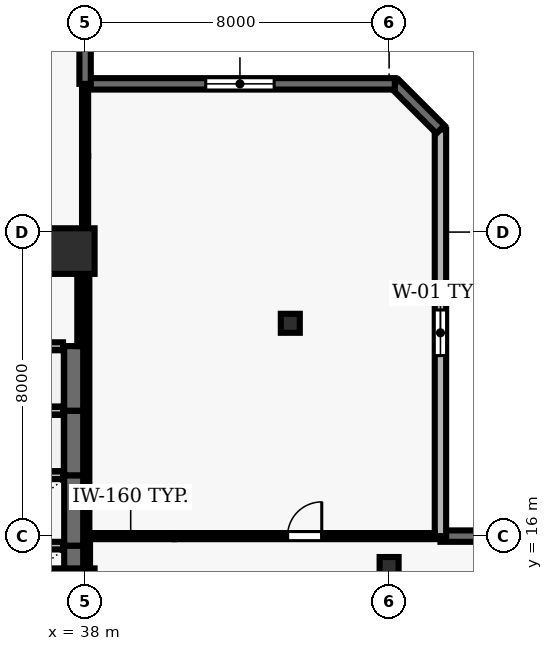
"""IFC4 building model, lengths in metres.
Left out: names, types, materials, properties, quantities, classifications, styles, units other than length and angle.
Written with IfcOpenShell. Run it as: python <this file> out.ifc"""

import sys

from ifc_helpers import new_model, si_unit, direction, frame, frame_2d, origin, origin_2d, place, context, subcontext, project, spatial, rectangle, hollow_rectangle, extrude, element, fill, save


model = new_model("IFC4")
c1 = context("Model", 3, precision=1e-05, world=origin(), true_north=direction((0.0, 1.0)))
c2 = subcontext(c1, "Body", "Model", "MODEL_VIEW")
j1 = project(units=[si_unit("LENGTHUNIT", "METRE"), si_unit("PLANEANGLEUNIT", "RADIAN")], contexts=[c1])
p1 = place(None, origin())
s1 = spatial("IfcSite", under=j1, at=p1, CompositionType="ELEMENT")
p2 = place(p1, origin())
s2 = spatial("IfcBuilding", under=s1, at=p2, CompositionType="ELEMENT")
p3 = place(p2, frame((0.0, 0.0, 130.7)))
s3 = spatial("IfcBuildingStorey", under=s2, at=p3, CompositionType="ELEMENT", Elevation=130.7)
for number, where, z_axis, x_axis in (
    (1, (37.65, 14.55, 0.0), (0.0, 0.0, 1.0), (1.0, 0.0, 0.0)),
    (2, (37.65, 23.5, 0.0), (0.0, 0.0, 1.0), (1.0, 0.0, 0.0)),
):
    element("IfcColumn", number, at=place(p3, frame(where, z_axis=z_axis, x_axis=x_axis)), inside=s3, PredefinedType="COLUMN", context=c2, shape_type="SweptSolid", body=[
        extrude(rectangle(XDim=1.2, YDim=1.2, at=origin_2d()), origin(), (0.0, 0.0, 1.0), 3.9),
    ])
for number, where, z_axis, x_axis in (
    (3, (46.0, 15.2, 0.0), (0.0, 0.0, 1.0), (1.0, 0.0, 0.0)),
    (4, (43.4, 21.6, 0.0), (0.0, 0.0, 1.0), (1.0, 0.0, 0.0)),
):
    element("IfcColumn", number, at=place(p3, frame(where, z_axis=z_axis, x_axis=x_axis)), inside=s3, PredefinedType="COLUMN", context=c2, shape_type="SweptSolid", body=[
        extrude(hollow_rectangle(XDim=0.5, YDim=0.5, WallThickness=0.025, at=origin_2d()), origin(), (0.0, 0.0, 1.0), 3.9),
    ])
p4 = place(p3, frame((68.1, 16.0, 0.0), z_axis=(0.0, 0.0, 1.0), x_axis=(-1.0, 0.0, 0.0)))
e5 = element("IfcWall", 5, at=p4, inside=s3, PredefinedType="SOLIDWALL", context=c2, shape_type="SweptSolid", body=[
    extrude(rectangle(XDim=20.749, YDim=0.3, at=frame_2d((10.375, 0.0))), origin(), (0.0, 0.0, 1.0), 3.69),
])
p5 = place(p4, frame((11.974, 0.0, 0.0)))
e6 = element("IfcOpeningElement", 6, at=p5, cuts=e5, PredefinedType="OPENING", context=c2, shape_type="SweptSolid", body=[
    extrude(rectangle(XDim=1.0, YDim=2.2, at=frame_2d((0.5, 1.1))), frame((0.0, 0.16, 0.0), z_axis=(0.0, -1.0, 0.0), x_axis=(1.0, 0.0, 0.0)), (0.0, 0.0, 1.0), 0.32),
])
p6 = place(p4, frame((1.958, 0.0, 0.9)))
e7 = element("IfcOpeningElement", 7, at=p6, cuts=e5, PredefinedType="OPENING", context=c2, shape_type="SweptSolid", body=[
    extrude(rectangle(XDim=3.0, YDim=2.2, at=frame_2d((1.5, 1.1))), frame((0.0, 0.16, 0.0), z_axis=(0.0, -1.0, 0.0), x_axis=(1.0, 0.0, 0.0)), (0.0, 0.0, 1.0), 0.32),
])
p7 = place(p4, frame((8.424, 0.0, 0.9)))
e8 = element("IfcOpeningElement", 8, at=p7, cuts=e5, PredefinedType="OPENING", context=c2, shape_type="SweptSolid", body=[
    extrude(rectangle(XDim=3.0, YDim=2.2, at=frame_2d((1.5, 1.1))), frame((0.0, 0.16, 0.0), z_axis=(0.0, -1.0, 0.0), x_axis=(1.0, 0.0, 0.0)), (0.0, 0.0, 1.0), 0.32),
])
p8 = place(p4, frame((15.791, 0.0, 0.9)))
e9 = element("IfcOpeningElement", 9, at=p8, cuts=e5, PredefinedType="OPENING", context=c2, shape_type="SweptSolid", body=[
    extrude(rectangle(XDim=3.0, YDim=2.2, at=frame_2d((1.5, 1.1))), frame((0.0, 0.16, 0.0), z_axis=(0.0, -1.0, 0.0), x_axis=(1.0, 0.0, 0.0)), (0.0, 0.0, 1.0), 0.32),
])
p9 = place(p3, frame((47.351, 16.0, 0.0), z_axis=(0.0, 0.0, 1.0), x_axis=(0.0, 1.0, 0.0)))
e10 = element("IfcWall", 10, at=p9, inside=s3, PredefinedType="SOLIDWALL", context=c2, shape_type="SweptSolid", body=[
    extrude(rectangle(XDim=10.7, YDim=0.3, at=frame_2d((5.35, 0.0))), origin(), (0.0, 0.0, 1.0), 3.69),
])
p10 = place(p9, frame((4.75, 0.0, 0.9)))
e11 = element("IfcOpeningElement", 11, at=p10, cuts=e10, PredefinedType="OPENING", context=c2, shape_type="SweptSolid", body=[
    extrude(rectangle(XDim=1.2, YDim=1.6, at=frame_2d((0.6, 0.8))), frame((0.0, 0.16, 0.0), z_axis=(0.0, -1.0, 0.0), x_axis=(1.0, 0.0, 0.0)), (0.0, 0.0, 1.0), 0.32),
])
p11 = place(p3, frame((47.351, 26.7, 0.0), z_axis=(0.0, 0.0, 1.0), x_axis=(-0.707178703759, 0.707034851297, 0.0)))
e12 = element("IfcWall", 12, at=p11, inside=s3, PredefinedType="SOLIDWALL", context=c2, shape_type="SweptSolid", body=[
    extrude(rectangle(XDim=1.697, YDim=0.3, at=frame_2d((0.849, 0.0))), origin(), (0.0, 0.0, 1.0), 3.69),
])
p12 = place(p3, frame((46.151, 27.9, 0.0), z_axis=(0.0, 0.0, 1.0), x_axis=(-1.0, 0.0, 0.0)))
e13 = element("IfcWall", 13, at=p12, inside=s3, PredefinedType="SOLIDWALL", context=c2, shape_type="SweptSolid", body=[
    extrude(rectangle(XDim=8.151, YDim=0.3, at=frame_2d((4.075, 0.0))), origin(), (0.0, 0.0, 1.0), 3.69),
])
p13 = place(p12, frame((3.176, 0.0, 0.9)))
e14 = element("IfcOpeningElement", 14, at=p13, cuts=e13, PredefinedType="OPENING", context=c2, shape_type="SweptSolid", body=[
    extrude(rectangle(XDim=1.8, YDim=1.6, at=frame_2d((0.9, 0.8))), frame((0.0, 0.16, 0.0), z_axis=(0.0, -1.0, 0.0), x_axis=(1.0, 0.0, 0.0)), (0.0, 0.0, 1.0), 0.32),
])
p14 = place(p3, frame((38.0, 27.9, 0.0), z_axis=(0.0, 0.0, 1.0), x_axis=(0.0, 1.0, 0.0)))
e15 = element("IfcWall", 15, at=p14, inside=s3, PredefinedType="SOLIDWALL", context=c2, shape_type="SweptSolid", body=[
    extrude(rectangle(XDim=18.2, YDim=0.3, at=frame_2d((9.1, 0.0))), origin(), (0.0, 0.0, 1.0), 3.69),
])
p15 = place(p14, frame((9.8, 0.0, 0.0)))
e16 = element("IfcOpeningElement", 16, at=p15, cuts=e15, PredefinedType="OPENING", context=c2, shape_type="SweptSolid", body=[
    extrude(rectangle(XDim=1.0, YDim=2.2, at=frame_2d((0.5, 1.1))), frame((0.0, 0.16, 0.0), z_axis=(0.0, -1.0, 0.0), x_axis=(1.0, 0.0, 0.0)), (0.0, 0.0, 1.0), 0.32),
])
p16 = place(p14, frame((2.883, 0.0, 0.9)))
e17 = element("IfcOpeningElement", 17, at=p16, cuts=e15, PredefinedType="OPENING", context=c2, shape_type="SweptSolid", body=[
    extrude(rectangle(XDim=2.1, YDim=1.6, at=frame_2d((1.05, 0.8))), frame((0.0, 0.16, 0.0), z_axis=(0.0, -1.0, 0.0), x_axis=(1.0, 0.0, 0.0)), (0.0, 0.0, 1.0), 0.32),
])
p17 = place(p14, frame((14.117, 0.0, 0.9)))
e18 = element("IfcOpeningElement", 18, at=p17, cuts=e15, PredefinedType="OPENING", context=c2, shape_type="SweptSolid", body=[
    extrude(rectangle(XDim=2.1, YDim=1.6, at=frame_2d((1.05, 0.8))), frame((0.0, 0.16, 0.0), z_axis=(0.0, -1.0, 0.0), x_axis=(1.0, 0.0, 0.0)), (0.0, 0.0, 1.0), 0.32),
])
p18 = place(p3, frame((37.7, 13.9, 0.0), z_axis=(0.0, 0.0, 1.0), x_axis=(0.0, 1.0, 0.0)))
e19 = element("IfcWall", 19, at=p18, inside=s3, PredefinedType="SHEAR", context=c2, shape_type="SweptSolid", body=[
    extrude(rectangle(XDim=1.85, YDim=0.5, at=frame_2d((0.925, 0.0))), origin(), (0.0, 0.0, 1.0), 3.69),
])
p19 = place(p3, frame((37.42, 15.75, 0.0), z_axis=(0.0, 0.0, 1.0), x_axis=(-1.0, 0.0, 0.0)))
e20 = element("IfcWall", 20, at=p19, inside=s3, PredefinedType="SOLIDWALL", context=c2, shape_type="SweptSolid", body=[
    extrude(rectangle(XDim=2.14, YDim=0.2, at=frame_2d((1.07, 0.0))), origin(), (0.0, 0.0, 1.0), 3.69),
])
p20 = place(p3, frame((37.7, 15.75, 0.0), z_axis=(0.0, 0.0, 1.0), x_axis=(0.0, 1.0, 0.0)))
e21 = element("IfcWall", 21, at=p20, inside=s3, PredefinedType="SHEAR", context=c2, shape_type="SweptSolid", body=[
    extrude(rectangle(XDim=1.85, YDim=0.5, at=frame_2d((0.925, 0.0))), origin(), (0.0, 0.0, 1.0), 3.69),
])
p21 = place(p3, frame((37.42, 17.6, 0.0), z_axis=(0.0, 0.0, 1.0), x_axis=(-1.0, 0.0, 0.0)))
e22 = element("IfcWall", 22, at=p21, inside=s3, PredefinedType="SOLIDWALL", context=c2, shape_type="SweptSolid", body=[
    extrude(rectangle(XDim=2.14, YDim=0.2, at=frame_2d((1.07, 0.0))), origin(), (0.0, 0.0, 1.0), 3.69),
])
p22 = place(p3, frame((37.7, 17.6, 0.0), z_axis=(0.0, 0.0, 1.0), x_axis=(0.0, 1.0, 0.0)))
e23 = element("IfcWall", 23, at=p22, inside=s3, PredefinedType="SHEAR", context=c2, shape_type="SweptSolid", body=[
    extrude(rectangle(XDim=1.7, YDim=0.5, at=frame_2d((0.85, 0.0))), origin(), (0.0, 0.0, 1.0), 3.69),
])
p23 = place(p3, frame((37.42, 19.3, 0.0), z_axis=(0.0, 0.0, 1.0), x_axis=(-1.0, 0.0, 0.0)))
e24 = element("IfcWall", 24, at=p23, inside=s3, PredefinedType="SOLIDWALL", context=c2, shape_type="SweptSolid", body=[
    extrude(rectangle(XDim=2.14, YDim=0.2, at=frame_2d((1.07, 0.0))), origin(), (0.0, 0.0, 1.0), 3.69),
])
p24 = place(p3, frame((37.7, 19.3, 0.0), z_axis=(0.0, 0.0, 1.0), x_axis=(0.0, 1.0, 0.0)))
e25 = element("IfcWall", 25, at=p24, inside=s3, PredefinedType="SHEAR", context=c2, shape_type="SweptSolid", body=[
    extrude(rectangle(XDim=1.7, YDim=0.5, at=frame_2d((0.85, 0.0))), origin(), (0.0, 0.0, 1.0), 3.69),
])
p25 = place(p3, frame((37.42, 21.0, 0.0), z_axis=(0.0, 0.0, 1.0), x_axis=(-1.0, 0.0, 0.0)))
e26 = element("IfcWall", 26, at=p25, inside=s3, PredefinedType="SOLIDWALL", context=c2, shape_type="SweptSolid", body=[
    extrude(rectangle(XDim=2.14, YDim=0.2, at=frame_2d((1.07, 0.0))), origin(), (0.0, 0.0, 1.0), 3.69),
])
p26 = place(p3, frame((37.85, 23.85, 0.0), z_axis=(0.0, 0.0, 1.0), x_axis=(-1.0, 0.0, 0.0)))
e27 = element("IfcWall", 27, at=p26, inside=s3, PredefinedType="PARTITIONING", context=c2, shape_type="SweptSolid", body=[
    extrude(rectangle(XDim=4.0, YDim=0.16, at=frame_2d((2.0, 0.0))), origin(), (0.0, 0.0, 1.0), 3.073),
])
p27 = place(p26, frame((2.25, 0.0, 0.0)))
e28 = element("IfcOpeningElement", 28, at=p27, cuts=e27, PredefinedType="OPENING", context=c2, shape_type="SweptSolid", body=[
    extrude(rectangle(XDim=0.9, YDim=2.1, at=frame_2d((0.45, 1.05))), frame((0.0, 0.09, 0.0), z_axis=(0.0, -1.0, 0.0), x_axis=(1.0, 0.0, 0.0)), (0.0, 0.0, 1.0), 0.18),
])
p28 = place(p3, frame((40.35, 16.0, 0.0), z_axis=(0.0, 0.0, 1.0), x_axis=(-1.0, 0.0, 0.0)))
e29 = element("IfcWall", 29, at=p28, inside=s3, PredefinedType="PARTITIONING", context=c2, shape_type="SweptSolid", body=[
    extrude(rectangle(XDim=2.3, YDim=0.16, at=frame_2d((1.15, 0.0))), origin(), (0.0, 0.0, 1.0), 3.69),
])
p29 = place(p3, frame((40.35, 16.0, 0.0), z_axis=(0.0, 0.0, 1.0), x_axis=(1.0, 0.0, 0.0)))
e30 = element("IfcWall", 30, at=p29, inside=s3, PredefinedType="PARTITIONING", context=c2, shape_type="SweptSolid", body=[
    extrude(rectangle(XDim=6.856, YDim=0.16, at=frame_2d((3.428, 0.0))), origin(), (0.0, 0.0, 1.0), 3.39),
])
p30 = place(p29, frame((2.978, 0.0, 0.0)))
e31 = element("IfcOpeningElement", 31, at=p30, cuts=e30, PredefinedType="OPENING", context=c2, shape_type="SweptSolid", body=[
    extrude(rectangle(XDim=0.9, YDim=2.1, at=frame_2d((0.45, 1.05))), frame((0.0, 0.09, 0.0), z_axis=(0.0, -1.0, 0.0), x_axis=(1.0, 0.0, 0.0)), (0.0, 0.0, 1.0), 0.18),
])
p31 = place(p3, frame((37.85, 21.0, 0.0), z_axis=(0.0, 0.0, 1.0), x_axis=(0.0, 1.0, 0.0)))
e32 = element("IfcWall", 32, at=p31, inside=s3, PredefinedType="MOVABLE", context=c2, shape_type="SweptSolid", body=[
    extrude(rectangle(XDim=2.775, YDim=0.11, at=frame_2d((1.387, 0.0))), origin(), (0.0, 0.0, 1.0), 3.073),
])
p32 = place(p3, frame((38.0, 23.85, 0.0), z_axis=(0.0, 0.0, 1.0), x_axis=(0.0, 1.0, 0.0)))
e33 = element("IfcWall", 33, at=p32, inside=s3, PredefinedType="PARTITIONING", context=c2, shape_type="SweptSolid", body=[
    extrude(rectangle(XDim=2.15, YDim=0.16, at=frame_2d((1.075, 0.0))), origin(), (0.0, 0.0, 1.0), 3.073),
])
p33 = place(p3, frame((38.0, 26.0, 0.0), z_axis=(0.0, 0.0, 1.0), x_axis=(0.0, 1.0, 0.0)))
e34 = element("IfcWall", 34, at=p33, inside=s3, PredefinedType="PARTITIONING", context=c2, shape_type="SweptSolid", body=[
    extrude(rectangle(XDim=1.755, YDim=0.16, at=frame_2d((0.877, 0.0))), origin(), (0.0, 0.0, 1.0), 3.073),
])
p34 = place(p3, frame((38.05, 15.925, 0.0), z_axis=(0.0, 0.0, 1.0), x_axis=(0.0, -1.0, 0.0)))
e35 = element("IfcWall", 35, at=p34, inside=s3, PredefinedType="PARTITIONING", context=c2, shape_type="SweptSolid", body=[
    extrude(rectangle(XDim=6.375, YDim=0.16, at=frame_2d((3.188, 0.0))), origin(), (0.0, 0.0, 1.0), 3.073),
])
p35 = place(p3, frame((38.05, 23.85, 0.0), z_axis=(0.0, 0.0, 1.0), x_axis=(0.0, -1.0, 0.0)))
e36 = element("IfcWall", 36, at=p35, inside=s3, PredefinedType="PARTITIONING", context=c2, shape_type="SweptSolid", body=[
    extrude(rectangle(XDim=7.775, YDim=0.125, at=frame_2d((3.888, 0.0))), origin(), (0.0, 0.0, 1.0), 3.073),
])
p36 = place(p10, origin())
e37 = element("IfcWindow", 37, at=p36, inside=s3, PartitioningType="SINGLE_PANEL", PredefinedType="WINDOW", context=c2, shape_type="SweptSolid", body=[
    extrude(rectangle(XDim=1.2, YDim=1.6, at=frame_2d((0.6, 0.8))), frame((0.0, 0.03, 0.0), z_axis=(0.0, -1.0, 0.0), x_axis=(1.0, 0.0, 0.0)), (0.0, 0.0, 1.0), 0.06),
])
fill(e11, e37)
p37 = place(p13, origin())
e38 = element("IfcWindow", 38, at=p37, inside=s3, PartitioningType="SINGLE_PANEL", PredefinedType="WINDOW", context=c2, shape_type="SweptSolid", body=[
    extrude(rectangle(XDim=1.8, YDim=1.6, at=frame_2d((0.9, 0.8))), frame((0.0, 0.03, 0.0), z_axis=(0.0, -1.0, 0.0), x_axis=(1.0, 0.0, 0.0)), (0.0, 0.0, 1.0), 0.06),
])
fill(e14, e38)
p38 = place(p30, origin())
e39 = element("IfcDoor", 39, at=p38, inside=s3, OperationType="SINGLE_SWING_RIGHT", PredefinedType="DOOR", context=c2, shape_type="SweptSolid", body=[
    extrude(rectangle(XDim=0.9, YDim=2.1, at=frame_2d((0.45, 1.05))), frame((0.0, 0.025, 0.0), z_axis=(0.0, -1.0, 0.0), x_axis=(1.0, 0.0, 0.0)), (0.0, 0.0, 1.0), 0.05),
])
fill(e31, e39)
save(model, sys.argv[1])
